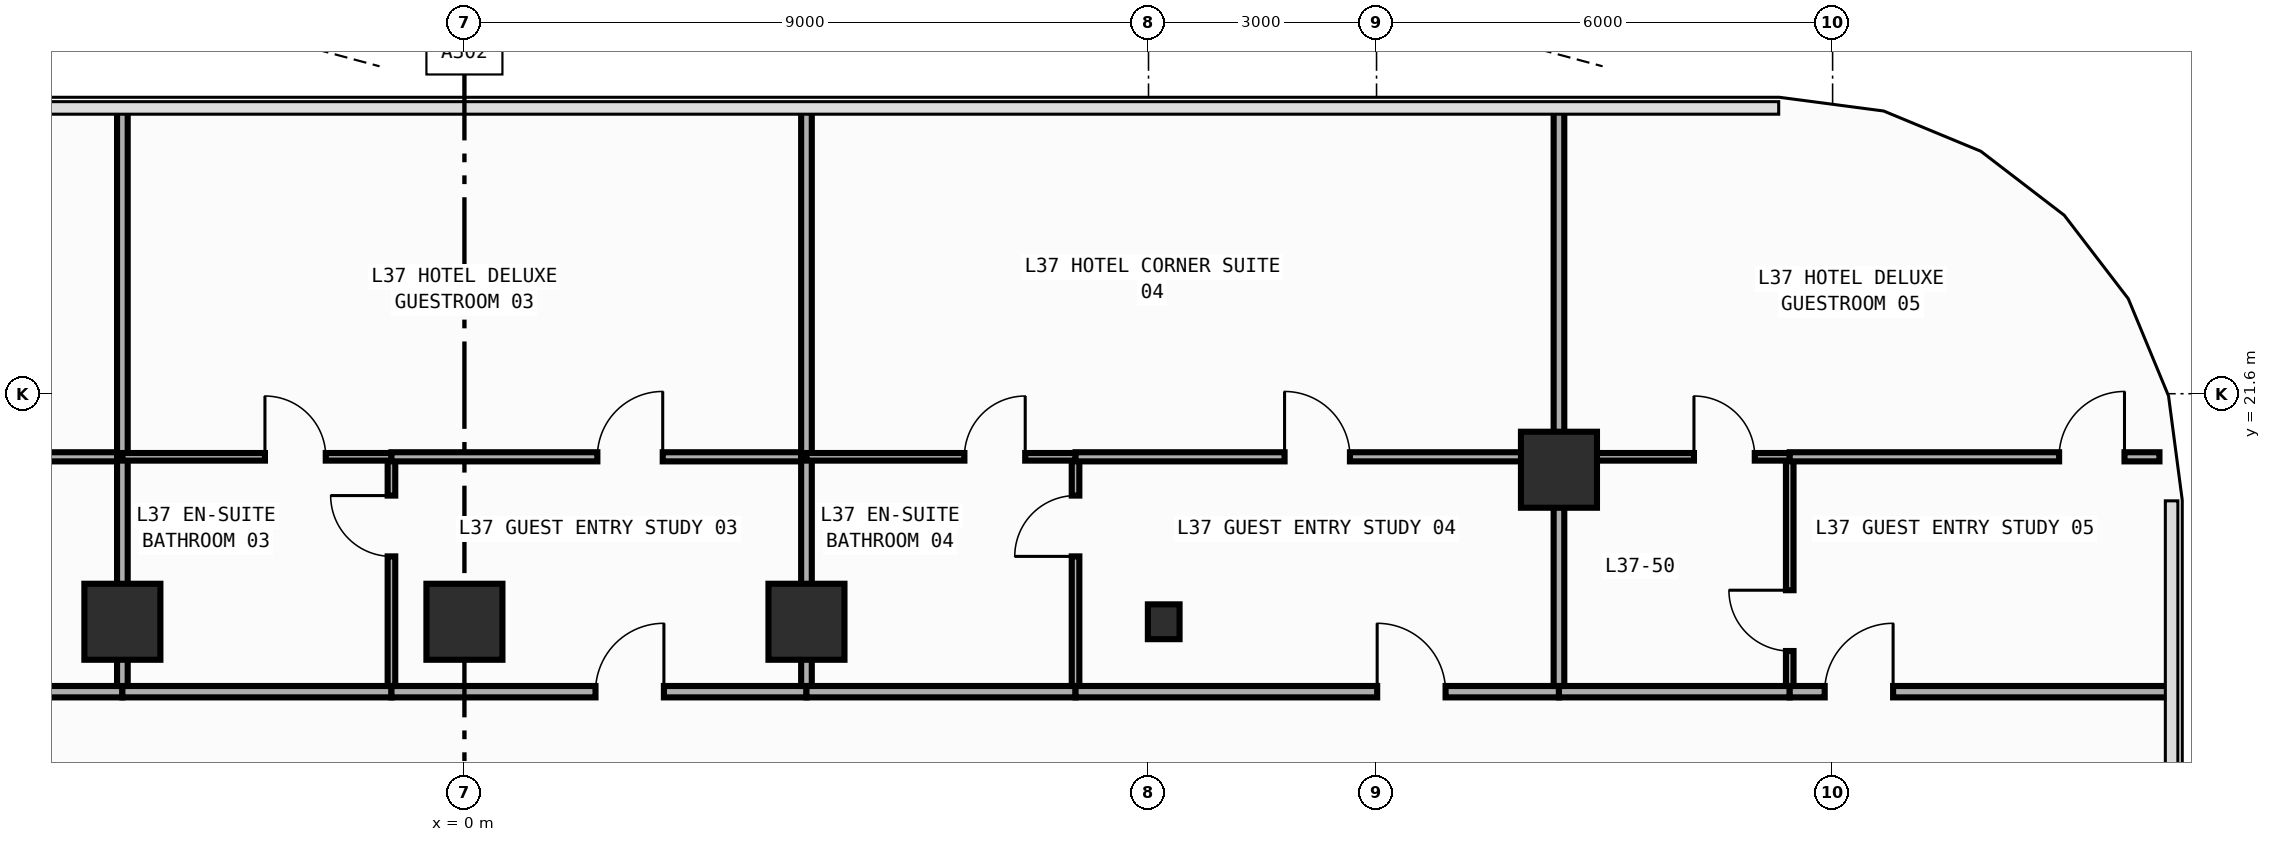
"""IFC4 building model, lengths in metres.
Left out: names, types, materials, properties, quantities, classifications, styles, units other than length and angle.
Written with IfcOpenShell. Run it as: python <this file> out.ifc"""

import sys

from ifc_helpers import new_model, si_unit, direction, frame, frame_2d, origin, origin_2d, place, context, subcontext, project, spatial, rectangle, i_section, extrude, element, fill, save


model = new_model("IFC4")
c1 = context("Model", 3, precision=1e-05, world=origin(), true_north=direction((0.0, 1.0)))
c2 = subcontext(c1, "Body", "Model", "MODEL_VIEW")
j1 = project(units=[si_unit("LENGTHUNIT", "METRE"), si_unit("PLANEANGLEUNIT", "RADIAN")], contexts=[c1])
p1 = place(None, origin())
s1 = spatial("IfcSite", under=j1, at=p1, CompositionType="ELEMENT")
p2 = place(p1, origin())
s2 = spatial("IfcBuilding", under=s1, at=p2, CompositionType="ELEMENT")
p3 = place(p2, frame((0.0, 0.0, 165.0)))
s3 = spatial("IfcBuildingStorey", under=s2, at=p3, CompositionType="ELEMENT", Elevation=165.0)
p4 = place(p3, frame((9.2, 18.6, 0.0), z_axis=(0.0, 0.0, 1.0), x_axis=(1.0, 0.0, 0.0)))
e1 = element("IfcColumn", 1, at=p4, inside=s3, PredefinedType="COLUMN", context=c2, shape_type="SweptSolid", body=[
    extrude(i_section(OverallWidth=0.417, OverallDepth=0.458, WebThickness=0.03, FlangeThickness=0.05, FilletRadius=0.022, at=origin_2d()), origin(), (0.0, 0.0, 1.0), 3.8),
])
for number, where, z_axis, x_axis in (
    (2, (-4.5, 18.6, 0.0), (0.0, 0.0, 1.0), (1.0, 0.0, 0.0)),
    (3, (0.0, 18.6, 0.0), (0.0, 0.0, 1.0), (1.0, 0.0, 0.0)),
    (4, (4.5, 18.6, 0.0), (0.0, 0.0, 1.0), (1.0, 0.0, 0.0)),
    (5, (14.4, 20.6, 0.0), (0.0, 0.0, 1.0), (1.0, 0.0, 0.0)),
):
    element("IfcColumn", number, at=place(p3, frame(where, z_axis=z_axis, x_axis=x_axis)), inside=s3, PredefinedType="COLUMN", context=c2, shape_type="SweptSolid", body=[
        extrude(rectangle(XDim=1.0, YDim=1.0, at=origin_2d()), origin(), (0.0, 0.0, 1.0), 3.8),
    ])
p5 = place(p3, frame((-10.86, 17.68, 0.0), z_axis=(0.0, 0.0, 1.0), x_axis=(1.0, 0.0, 0.0)))
e6 = element("IfcWall", 6, at=p5, inside=s3, PredefinedType="PARTITIONING", context=c2, shape_type="SweptSolid", body=[
    extrude(rectangle(XDim=6.36, YDim=0.15, at=frame_2d((3.18, 0.0))), origin(), (0.0, 0.0, 1.0), 3.54),
])
p6 = place(p5, frame((3.349, 0.0, 0.0)))
e7 = element("IfcOpeningElement", 7, at=p6, cuts=e6, PredefinedType="OPENING", context=c2, shape_type="SweptSolid", body=[
    extrude(rectangle(XDim=0.9, YDim=2.15, at=frame_2d((0.45, 1.075))), frame((0.0, 0.085, 0.0), z_axis=(0.0, -1.0, 0.0), x_axis=(1.0, 0.0, 0.0)), (0.0, 0.0, 1.0), 0.17),
])
p7 = place(p3, frame((-4.5, 17.68, 0.0), z_axis=(0.0, 0.0, 1.0), x_axis=(1.0, 0.0, 0.0)))
e8 = element("IfcWall", 8, at=p7, inside=s3, PredefinedType="PARTITIONING", context=c2, shape_type="SweptSolid", body=[
    extrude(rectangle(XDim=3.54, YDim=0.15, at=frame_2d((1.77, 0.0))), origin(), (0.0, 0.0, 1.0), 3.54),
])
p8 = place(p3, frame((-0.96, 17.68, 0.0), z_axis=(0.0, 0.0, 1.0), x_axis=(1.0, 0.0, 0.0)))
e9 = element("IfcWall", 9, at=p8, inside=s3, PredefinedType="PARTITIONING", context=c2, shape_type="SweptSolid", body=[
    extrude(rectangle(XDim=5.46, YDim=0.15, at=frame_2d((2.73, 0.0))), origin(), (0.0, 0.0, 1.0), 3.54),
])
p9 = place(p8, frame((2.684, 0.0, 0.0)))
e10 = element("IfcOpeningElement", 10, at=p9, cuts=e9, PredefinedType="OPENING", context=c2, shape_type="SweptSolid", body=[
    extrude(rectangle(XDim=0.9, YDim=2.15, at=frame_2d((0.45, 1.075))), frame((0.0, 0.085, 0.0), z_axis=(0.0, -1.0, 0.0), x_axis=(1.0, 0.0, 0.0)), (0.0, 0.0, 1.0), 0.17),
])
p10 = place(p3, frame((4.5, 17.68, 0.0), z_axis=(0.0, 0.0, 1.0), x_axis=(1.0, 0.0, 0.0)))
e11 = element("IfcWall", 11, at=p10, inside=s3, PredefinedType="PARTITIONING", context=c2, shape_type="SweptSolid", body=[
    extrude(rectangle(XDim=3.54, YDim=0.15, at=frame_2d((1.77, 0.0))), origin(), (0.0, 0.0, 1.0), 3.54),
])
p11 = place(p3, frame((8.04, 17.68, 0.0), z_axis=(0.0, 0.0, 1.0), x_axis=(1.0, 0.0, 0.0)))
e12 = element("IfcWall", 12, at=p11, inside=s3, PredefinedType="PARTITIONING", context=c2, shape_type="SweptSolid", body=[
    extrude(rectangle(XDim=6.36, YDim=0.15, at=frame_2d((3.18, 0.0))), origin(), (0.0, 0.0, 1.0), 3.54),
])
p12 = place(p11, frame((3.968, 0.0, 0.0)))
e13 = element("IfcOpeningElement", 13, at=p12, cuts=e12, PredefinedType="OPENING", context=c2, shape_type="SweptSolid", body=[
    extrude(rectangle(XDim=0.9, YDim=2.15, at=frame_2d((0.45, 1.075))), frame((0.0, 0.085, 0.0), z_axis=(0.0, -1.0, 0.0), x_axis=(1.0, 0.0, 0.0)), (0.0, 0.0, 1.0), 0.17),
])
p13 = place(p3, frame((14.4, 17.68, 0.0), z_axis=(0.0, 0.0, 1.0), x_axis=(1.0, 0.0, 0.0)))
e14 = element("IfcWall", 14, at=p13, inside=s3, PredefinedType="PARTITIONING", context=c2, shape_type="SweptSolid", body=[
    extrude(rectangle(XDim=3.036, YDim=0.15, at=frame_2d((1.518, 0.0))), origin(), (0.0, 0.0, 1.0), 3.54),
])
p14 = place(p3, frame((17.436, 17.68, 0.0), z_axis=(0.0, 0.0, 1.0), x_axis=(1.0, 0.0, 0.0)))
e15 = element("IfcWall", 15, at=p14, inside=s3, PredefinedType="PARTITIONING", context=c2, shape_type="SweptSolid", body=[
    extrude(rectangle(XDim=5.019, YDim=0.15, at=frame_2d((2.51, 0.0))), origin(), (0.0, 0.0, 1.0), 3.54),
])
p15 = place(p14, frame((0.46, 0.0, 0.0)))
e16 = element("IfcOpeningElement", 16, at=p15, cuts=e15, PredefinedType="OPENING", context=c2, shape_type="SweptSolid", body=[
    extrude(rectangle(XDim=0.9, YDim=2.15, at=frame_2d((0.45, 1.075))), frame((0.0, 0.085, 0.0), z_axis=(0.0, -1.0, 0.0), x_axis=(1.0, 0.0, 0.0)), (0.0, 0.0, 1.0), 0.17),
])
p16 = place(p3, frame((-10.86, 20.77, 0.0), z_axis=(0.0, 0.0, 1.0), x_axis=(1.0, 0.0, 0.0)))
e17 = element("IfcWall", 17, at=p16, inside=s3, PredefinedType="PARTITIONING", context=c2, shape_type="SweptSolid", body=[
    extrude(rectangle(XDim=6.36, YDim=0.12, at=frame_2d((3.18, 0.0))), origin(), (0.0, 0.0, 1.0), 3.54),
])
p17 = place(p16, frame((3.375, 0.0, 0.0)))
e18 = element("IfcOpeningElement", 18, at=p17, cuts=e17, PredefinedType="OPENING", context=c2, shape_type="SweptSolid", body=[
    extrude(rectangle(XDim=0.86, YDim=2.15, at=frame_2d((0.43, 1.075))), frame((0.0, 0.07, 0.0), z_axis=(0.0, -1.0, 0.0), x_axis=(1.0, 0.0, 0.0)), (0.0, 0.0, 1.0), 0.14),
])
p18 = place(p3, frame((-4.5, 17.755, 0.0), z_axis=(0.0, 0.0, 1.0), x_axis=(0.0, 1.0, 0.0)))
e19 = element("IfcWall", 19, at=p18, inside=s3, PredefinedType="PARTITIONING", context=c2, shape_type="SweptSolid", body=[
    extrude(rectangle(XDim=3.015, YDim=0.14, at=frame_2d((1.508, 0.0))), origin(), (0.0, 0.0, 1.0), 3.54),
])
p19 = place(p3, frame((-4.5, 20.77, 0.0), z_axis=(0.0, 0.0, 1.0), x_axis=(0.0, 1.0, 0.0)))
e20 = element("IfcWall", 20, at=p19, inside=s3, PredefinedType="PARTITIONING", context=c2, shape_type="SweptSolid", body=[
    extrude(rectangle(XDim=4.585, YDim=0.14, at=frame_2d((2.292, 0.0))), origin(), (0.0, 0.0, 1.0), 3.54),
])
p20 = place(p3, frame((-0.96, 17.755, 0.0), z_axis=(0.0, 0.0, 1.0), x_axis=(0.0, 1.0, 0.0)))
e21 = element("IfcWall", 21, at=p20, inside=s3, PredefinedType="PARTITIONING", context=c2, shape_type="SweptSolid", body=[
    extrude(rectangle(XDim=2.965, YDim=0.1, at=frame_2d((1.482, 0.0))), origin(), (0.0, 0.0, 1.0), 3.54),
])
p21 = place(p20, frame((1.705, 0.0, 0.0)))
e22 = element("IfcOpeningElement", 22, at=p21, cuts=e21, PredefinedType="OPENING", context=c2, shape_type="SweptSolid", body=[
    extrude(rectangle(XDim=0.8, YDim=2.1, at=frame_2d((0.4, 1.05))), frame((0.0, 0.06, 0.0), z_axis=(0.0, -1.0, 0.0), x_axis=(1.0, 0.0, 0.0)), (0.0, 0.0, 1.0), 0.12),
])
p22 = place(p3, frame((-4.5, 20.77, 0.0), z_axis=(0.0, 0.0, 1.0), x_axis=(1.0, 0.0, 0.0)))
e23 = element("IfcWall", 23, at=p22, inside=s3, PredefinedType="PARTITIONING", context=c2, shape_type="SweptSolid", body=[
    extrude(rectangle(XDim=3.54, YDim=0.1, at=frame_2d((1.77, 0.0))), origin(), (0.0, 0.0, 1.0), 3.54),
])
p23 = place(p22, frame((1.875, 0.0, 0.0)))
e24 = element("IfcOpeningElement", 24, at=p23, cuts=e23, PredefinedType="OPENING", context=c2, shape_type="SweptSolid", body=[
    extrude(rectangle(XDim=0.8, YDim=2.1, at=frame_2d((0.4, 1.05))), frame((0.0, 0.06, 0.0), z_axis=(0.0, -1.0, 0.0), x_axis=(1.0, 0.0, 0.0)), (0.0, 0.0, 1.0), 0.12),
])
p24 = place(p3, frame((-0.96, 20.77, 0.0), z_axis=(0.0, 0.0, 1.0), x_axis=(1.0, 0.0, 0.0)))
e25 = element("IfcWall", 25, at=p24, inside=s3, PredefinedType="PARTITIONING", context=c2, shape_type="SweptSolid", body=[
    extrude(rectangle(XDim=5.46, YDim=0.12, at=frame_2d((2.73, 0.0))), origin(), (0.0, 0.0, 1.0), 3.54),
])
p25 = place(p24, frame((2.709, 0.0, 0.0)))
e26 = element("IfcOpeningElement", 26, at=p25, cuts=e25, PredefinedType="OPENING", context=c2, shape_type="SweptSolid", body=[
    extrude(rectangle(XDim=0.86, YDim=2.15, at=frame_2d((0.43, 1.075))), frame((0.0, 0.07, 0.0), z_axis=(0.0, -1.0, 0.0), x_axis=(1.0, 0.0, 0.0)), (0.0, 0.0, 1.0), 0.14),
])
p26 = place(p3, frame((4.5, 17.755, 0.0), z_axis=(0.0, 0.0, 1.0), x_axis=(0.0, 1.0, 0.0)))
e27 = element("IfcWall", 27, at=p26, inside=s3, PredefinedType="PARTITIONING", context=c2, shape_type="SweptSolid", body=[
    extrude(rectangle(XDim=3.015, YDim=0.14, at=frame_2d((1.508, 0.0))), origin(), (0.0, 0.0, 1.0), 3.54),
])
p27 = place(p3, frame((4.5, 20.77, 0.0), z_axis=(0.0, 0.0, 1.0), x_axis=(0.0, 1.0, 0.0)))
e28 = element("IfcWall", 28, at=p27, inside=s3, PredefinedType="PARTITIONING", context=c2, shape_type="SweptSolid", body=[
    extrude(rectangle(XDim=4.585, YDim=0.14, at=frame_2d((2.292, 0.0))), origin(), (0.0, 0.0, 1.0), 3.54),
])
p28 = place(p3, frame((8.04, 17.755, 0.0), z_axis=(0.0, 0.0, 1.0), x_axis=(0.0, 1.0, 0.0)))
e29 = element("IfcWall", 29, at=p28, inside=s3, PredefinedType="PARTITIONING", context=c2, shape_type="SweptSolid", body=[
    extrude(rectangle(XDim=2.965, YDim=0.1, at=frame_2d((1.482, 0.0))), origin(), (0.0, 0.0, 1.0), 3.54),
])
p29 = place(p28, frame((1.705, 0.0, 0.0)))
e30 = element("IfcOpeningElement", 30, at=p29, cuts=e29, PredefinedType="OPENING", context=c2, shape_type="SweptSolid", body=[
    extrude(rectangle(XDim=0.8, YDim=2.1, at=frame_2d((0.4, 1.05))), frame((0.0, 0.06, 0.0), z_axis=(0.0, -1.0, 0.0), x_axis=(1.0, 0.0, 0.0)), (0.0, 0.0, 1.0), 0.12),
])
p30 = place(p3, frame((4.5, 20.77, 0.0), z_axis=(0.0, 0.0, 1.0), x_axis=(1.0, 0.0, 0.0)))
e31 = element("IfcWall", 31, at=p30, inside=s3, PredefinedType="PARTITIONING", context=c2, shape_type="SweptSolid", body=[
    extrude(rectangle(XDim=3.54, YDim=0.1, at=frame_2d((1.77, 0.0))), origin(), (0.0, 0.0, 1.0), 3.54),
])
p31 = place(p30, frame((2.078, 0.0, 0.0)))
e32 = element("IfcOpeningElement", 32, at=p31, cuts=e31, PredefinedType="OPENING", context=c2, shape_type="SweptSolid", body=[
    extrude(rectangle(XDim=0.8, YDim=2.1, at=frame_2d((0.4, 1.05))), frame((0.0, 0.06, 0.0), z_axis=(0.0, -1.0, 0.0), x_axis=(1.0, 0.0, 0.0)), (0.0, 0.0, 1.0), 0.12),
])
p32 = place(p3, frame((8.04, 20.77, 0.0), z_axis=(0.0, 0.0, 1.0), x_axis=(1.0, 0.0, 0.0)))
e33 = element("IfcWall", 33, at=p32, inside=s3, PredefinedType="PARTITIONING", context=c2, shape_type="SweptSolid", body=[
    extrude(rectangle(XDim=6.36, YDim=0.12, at=frame_2d((3.18, 0.0))), origin(), (0.0, 0.0, 1.0), 3.54),
])
p33 = place(p32, frame((2.75, 0.0, 0.0)))
e34 = element("IfcOpeningElement", 34, at=p33, cuts=e33, PredefinedType="OPENING", context=c2, shape_type="SweptSolid", body=[
    extrude(rectangle(XDim=0.86, YDim=2.15, at=frame_2d((0.43, 1.075))), frame((0.0, 0.07, 0.0), z_axis=(0.0, -1.0, 0.0), x_axis=(1.0, 0.0, 0.0)), (0.0, 0.0, 1.0), 0.14),
])
p34 = place(p3, frame((14.4, 17.755, 0.0), z_axis=(0.0, 0.0, 1.0), x_axis=(0.0, 1.0, 0.0)))
e35 = element("IfcWall", 35, at=p34, inside=s3, PredefinedType="PARTITIONING", context=c2, shape_type="SweptSolid", body=[
    extrude(rectangle(XDim=3.015, YDim=0.14, at=frame_2d((1.508, 0.0))), origin(), (0.0, 0.0, 1.0), 2.952),
])
p35 = place(p3, frame((14.4, 20.77, 0.0), z_axis=(0.0, 0.0, 1.0), x_axis=(0.0, 1.0, 0.0)))
e36 = element("IfcWall", 36, at=p35, inside=s3, PredefinedType="PARTITIONING", context=c2, shape_type="SweptSolid", body=[
    extrude(rectangle(XDim=4.585, YDim=0.14, at=frame_2d((2.292, 0.0))), origin(), (0.0, 0.0, 1.0), 2.952),
])
p36 = place(p3, frame((17.436, 17.755, 0.0), z_axis=(0.0, 0.0, 1.0), x_axis=(0.0, 1.0, 0.0)))
e37 = element("IfcWall", 37, at=p36, inside=s3, PredefinedType="PARTITIONING", context=c2, shape_type="SweptSolid", body=[
    extrude(rectangle(XDim=2.965, YDim=0.1, at=frame_2d((1.482, 0.0))), origin(), (0.0, 0.0, 1.0), 3.54),
])
p37 = place(p36, frame((0.46, 0.0, 0.0)))
e38 = element("IfcOpeningElement", 38, at=p37, cuts=e37, PredefinedType="OPENING", context=c2, shape_type="SweptSolid", body=[
    extrude(rectangle(XDim=0.8, YDim=2.1, at=frame_2d((0.4, 1.05))), frame((0.0, 0.06, 0.0), z_axis=(0.0, -1.0, 0.0), x_axis=(1.0, 0.0, 0.0)), (0.0, 0.0, 1.0), 0.12),
])
p38 = place(p3, frame((14.4, 20.77, 0.0), z_axis=(0.0, 0.0, 1.0), x_axis=(1.0, 0.0, 0.0)))
e39 = element("IfcWall", 39, at=p38, inside=s3, PredefinedType="PARTITIONING", context=c2, shape_type="SweptSolid", body=[
    extrude(rectangle(XDim=3.036, YDim=0.1, at=frame_2d((1.518, 0.0))), origin(), (0.0, 0.0, 1.0), 3.54),
])
p39 = place(p38, frame((1.776, 0.0, 0.0)))
e40 = element("IfcOpeningElement", 40, at=p39, cuts=e39, PredefinedType="OPENING", context=c2, shape_type="SweptSolid", body=[
    extrude(rectangle(XDim=0.8, YDim=2.1, at=frame_2d((0.4, 1.05))), frame((0.0, 0.06, 0.0), z_axis=(0.0, -1.0, 0.0), x_axis=(1.0, 0.0, 0.0)), (0.0, 0.0, 1.0), 0.12),
])
p40 = place(p3, frame((17.436, 20.77, 0.0), z_axis=(0.0, 0.0, 1.0), x_axis=(1.0, 0.0, 0.0)))
e41 = element("IfcWall", 41, at=p40, inside=s3, PredefinedType="PARTITIONING", context=c2, shape_type="SweptSolid", body=[
    extrude(rectangle(XDim=4.864, YDim=0.12, at=frame_2d((2.432, 0.0))), origin(), (0.0, 0.0, 1.0), 3.54),
])
p41 = place(p40, frame((3.544, 0.0, 0.0)))
e42 = element("IfcOpeningElement", 42, at=p41, cuts=e41, PredefinedType="OPENING", context=c2, shape_type="SweptSolid", body=[
    extrude(rectangle(XDim=0.86, YDim=2.15, at=frame_2d((0.43, 1.075))), frame((0.0, 0.07, 0.0), z_axis=(0.0, -1.0, 0.0), x_axis=(1.0, 0.0, 0.0)), (0.0, 0.0, 1.0), 0.14),
])
p42 = place(p9, origin())
e43 = element("IfcDoor", 43, at=p42, inside=s3, OperationType="SINGLE_SWING_RIGHT", PredefinedType="DOOR", context=c2, shape_type="SweptSolid", body=[
    extrude(rectangle(XDim=0.9, YDim=2.15, at=frame_2d((0.45, 1.075))), frame((0.0, 0.025, 0.0), z_axis=(0.0, -1.0, 0.0), x_axis=(1.0, 0.0, 0.0)), (0.0, 0.0, 1.0), 0.05),
])
fill(e10, e43)
p43 = place(p12, origin())
e44 = element("IfcDoor", 44, at=p43, inside=s3, OperationType="SINGLE_SWING_LEFT", PredefinedType="DOOR", context=c2, shape_type="SweptSolid", body=[
    extrude(rectangle(XDim=0.9, YDim=2.15, at=frame_2d((0.45, 1.075))), frame((0.0, 0.025, 0.0), z_axis=(0.0, -1.0, 0.0), x_axis=(1.0, 0.0, 0.0)), (0.0, 0.0, 1.0), 0.05),
])
fill(e13, e44)
p44 = place(p15, origin())
e45 = element("IfcDoor", 45, at=p44, inside=s3, OperationType="SINGLE_SWING_RIGHT", PredefinedType="DOOR", context=c2, shape_type="SweptSolid", body=[
    extrude(rectangle(XDim=0.9, YDim=2.15, at=frame_2d((0.45, 1.075))), frame((0.0, 0.025, 0.0), z_axis=(0.0, -1.0, 0.0), x_axis=(1.0, 0.0, 0.0)), (0.0, 0.0, 1.0), 0.05),
])
fill(e16, e45)
p45 = place(p21, origin())
e46 = element("IfcDoor", 46, at=p45, inside=s3, OperationType="SINGLE_SWING_RIGHT", PredefinedType="DOOR", context=c2, shape_type="SweptSolid", body=[
    extrude(rectangle(XDim=0.8, YDim=2.1, at=frame_2d((0.4, 1.05))), frame((0.0, 0.025, 0.0), z_axis=(0.0, -1.0, 0.0), x_axis=(1.0, 0.0, 0.0)), (0.0, 0.0, 1.0), 0.05),
])
fill(e22, e46)
p46 = place(p23, origin())
e47 = element("IfcDoor", 47, at=p46, inside=s3, OperationType="SINGLE_SWING_LEFT", PredefinedType="DOOR", context=c2, shape_type="SweptSolid", body=[
    extrude(rectangle(XDim=0.8, YDim=2.1, at=frame_2d((0.4, 1.05))), frame((0.0, 0.025, 0.0), z_axis=(0.0, -1.0, 0.0), x_axis=(1.0, 0.0, 0.0)), (0.0, 0.0, 1.0), 0.05),
])
fill(e24, e47)
p47 = place(p25, origin())
e48 = element("IfcDoor", 48, at=p47, inside=s3, OperationType="SINGLE_SWING_RIGHT", PredefinedType="DOOR", context=c2, shape_type="SweptSolid", body=[
    extrude(rectangle(XDim=0.86, YDim=2.15, at=frame_2d((0.43, 1.075))), frame((0.0, 0.025, 0.0), z_axis=(0.0, -1.0, 0.0), x_axis=(1.0, 0.0, 0.0)), (0.0, 0.0, 1.0), 0.05),
])
fill(e26, e48)
p48 = place(p29, origin())
e49 = element("IfcDoor", 49, at=p48, inside=s3, OperationType="SINGLE_SWING_LEFT", PredefinedType="DOOR", context=c2, shape_type="SweptSolid", body=[
    extrude(rectangle(XDim=0.8, YDim=2.1, at=frame_2d((0.4, 1.05))), frame((0.0, 0.025, 0.0), z_axis=(0.0, -1.0, 0.0), x_axis=(1.0, 0.0, 0.0)), (0.0, 0.0, 1.0), 0.05),
])
fill(e30, e49)
p49 = place(p31, origin())
e50 = element("IfcDoor", 50, at=p49, inside=s3, OperationType="SINGLE_SWING_RIGHT", PredefinedType="DOOR", context=c2, shape_type="SweptSolid", body=[
    extrude(rectangle(XDim=0.8, YDim=2.1, at=frame_2d((0.4, 1.05))), frame((0.0, 0.025, 0.0), z_axis=(0.0, -1.0, 0.0), x_axis=(1.0, 0.0, 0.0)), (0.0, 0.0, 1.0), 0.05),
])
fill(e32, e50)
p50 = place(p33, origin())
e51 = element("IfcDoor", 51, at=p50, inside=s3, OperationType="SINGLE_SWING_LEFT", PredefinedType="DOOR", context=c2, shape_type="SweptSolid", body=[
    extrude(rectangle(XDim=0.86, YDim=2.15, at=frame_2d((0.43, 1.075))), frame((0.0, 0.025, 0.0), z_axis=(0.0, -1.0, 0.0), x_axis=(1.0, 0.0, 0.0)), (0.0, 0.0, 1.0), 0.05),
])
fill(e34, e51)
p51 = place(p37, origin())
e52 = element("IfcDoor", 52, at=p51, inside=s3, OperationType="SINGLE_SWING_RIGHT", PredefinedType="DOOR", context=c2, shape_type="SweptSolid", body=[
    extrude(rectangle(XDim=0.8, YDim=2.1, at=frame_2d((0.4, 1.05))), frame((0.0, 0.025, 0.0), z_axis=(0.0, -1.0, 0.0), x_axis=(1.0, 0.0, 0.0)), (0.0, 0.0, 1.0), 0.05),
])
fill(e38, e52)
p52 = place(p39, origin())
e53 = element("IfcDoor", 53, at=p52, inside=s3, OperationType="SINGLE_SWING_LEFT", PredefinedType="DOOR", context=c2, shape_type="SweptSolid", body=[
    extrude(rectangle(XDim=0.8, YDim=2.1, at=frame_2d((0.4, 1.05))), frame((0.0, 0.025, 0.0), z_axis=(0.0, -1.0, 0.0), x_axis=(1.0, 0.0, 0.0)), (0.0, 0.0, 1.0), 0.05),
])
fill(e40, e53)
p53 = place(p41, origin())
e54 = element("IfcDoor", 54, at=p53, inside=s3, OperationType="SINGLE_SWING_RIGHT", PredefinedType="DOOR", context=c2, shape_type="SweptSolid", body=[
    extrude(rectangle(XDim=0.86, YDim=2.15, at=frame_2d((0.43, 1.075))), frame((0.0, 0.025, 0.0), z_axis=(0.0, -1.0, 0.0), x_axis=(1.0, 0.0, 0.0)), (0.0, 0.0, 1.0), 0.05),
])
fill(e42, e54)
save(model, sys.argv[1])
